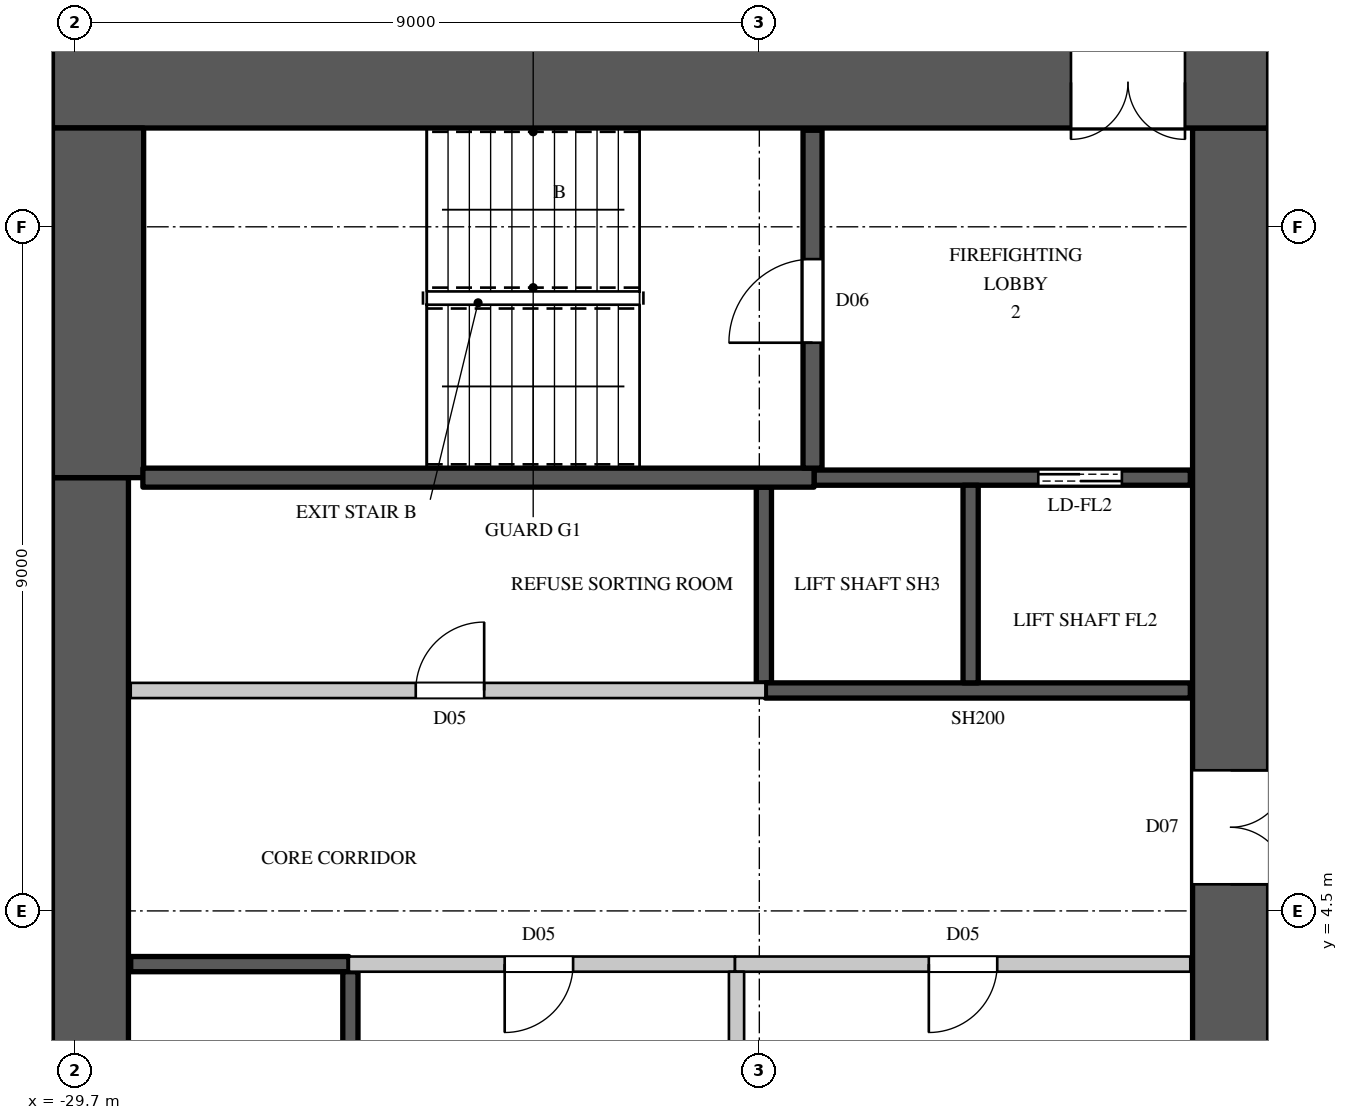
"""IFC4 building model, lengths in metres.
Left out: names, types, materials, properties, quantities, classifications, styles, units other than length and angle.
Written with IfcOpenShell. Run it as: python <this file> out.ifc"""

import sys

from ifc_helpers import new_model, si_unit, direction, frame, frame_2d, origin, place, context, subcontext, project, spatial, rectangle, extrude, element, fill, save


model = new_model("IFC4")
c1 = context("Model", 3, precision=1e-05, world=origin(), true_north=direction((0.0, 1.0)))
c2 = subcontext(c1, "Body", "Model", "MODEL_VIEW")
j1 = project(units=[si_unit("LENGTHUNIT", "METRE"), si_unit("PLANEANGLEUNIT", "RADIAN")], contexts=[c1])
p1 = place(None, origin())
s1 = spatial("IfcSite", under=j1, at=p1, CompositionType="ELEMENT")
p2 = place(p1, origin())
s2 = spatial("IfcBuilding", under=s1, at=p2, CompositionType="ELEMENT")
p3 = place(p2, frame((0.0, 0.0, 62.7)))
s3 = spatial("IfcBuildingStorey", under=s2, at=p3, CompositionType="ELEMENT", Elevation=62.7)
p4 = place(p3, frame((-30.0, 15.4, 0.0), z_axis=(0.0, 0.0, 1.0), x_axis=(1.0, 0.0, 0.0)))
e1 = element("IfcWall", 1, at=p4, inside=s3, PredefinedType="SHEAR", context=c2, shape_type="SweptSolid", body=[
    extrude(rectangle(XDim=16.0, YDim=1.2, at=frame_2d((8.0, 0.0))), origin(), (0.0, 0.0, 1.0), 3.6),
])
p5 = place(p4, frame((13.4, 0.0, 0.0)))
e2 = element("IfcOpeningElement", 2, at=p5, cuts=e1, PredefinedType="OPENING", context=c2, shape_type="SweptSolid", body=[
    extrude(rectangle(XDim=1.5, YDim=2.4, at=frame_2d((0.75, 1.2))), frame((0.0, 0.61, 0.0), z_axis=(0.0, -1.0, 0.0), x_axis=(1.0, 0.0, 0.0)), (0.0, 0.0, 1.0), 1.22),
])
p6 = place(p3, frame((-14.5, -14.8, 0.0), z_axis=(0.0, 0.0, 1.0), x_axis=(0.0, 1.0, 0.0)))
e3 = element("IfcWall", 3, at=p6, inside=s3, PredefinedType="SHEAR", context=c2, shape_type="SweptSolid", body=[
    extrude(rectangle(XDim=29.6, YDim=1.0, at=frame_2d((14.8, 0.0))), origin(), (0.0, 0.0, 1.0), 3.6),
])
p7 = place(p6, frame((8.45, 0.0, 0.0)))
e4 = element("IfcOpeningElement", 4, at=p7, cuts=e3, PredefinedType="OPENING", context=c2, shape_type="SweptSolid", body=[
    extrude(rectangle(XDim=1.5, YDim=2.4, at=frame_2d((0.75, 1.2))), frame((0.0, 0.51, 0.0), z_axis=(0.0, -1.0, 0.0), x_axis=(1.0, 0.0, 0.0)), (0.0, 0.0, 1.0), 1.02),
])
p8 = place(p6, frame((19.65, 0.0, 0.0)))
e5 = element("IfcOpeningElement", 5, at=p8, cuts=e3, PredefinedType="OPENING", context=c2, shape_type="SweptSolid", body=[
    extrude(rectangle(XDim=1.5, YDim=2.4, at=frame_2d((0.75, 1.2))), frame((0.0, 0.51, 0.0), z_axis=(0.0, -1.0, 0.0), x_axis=(1.0, 0.0, 0.0)), (0.0, 0.0, 1.0), 1.02),
])
p9 = place(p6, frame((14.5, 0.0, 0.0)))
e6 = element("IfcOpeningElement", 6, at=p9, cuts=e3, PredefinedType="OPENING", context=c2, shape_type="SweptSolid", body=[
    extrude(rectangle(XDim=0.6, YDim=2.0, at=frame_2d((0.3, 1.0))), frame((0.0, 0.51, 0.0), z_axis=(0.0, -1.0, 0.0), x_axis=(1.0, 0.0, 0.0)), (0.0, 0.0, 1.0), 1.02),
])
p10 = place(p3, frame((-29.5, -10.2, 0.0), z_axis=(0.0, 0.0, 1.0), x_axis=(0.0, 1.0, 0.0)))
e7 = element("IfcWall", 7, at=p10, inside=s3, PredefinedType="SHEAR", context=c2, shape_type="SweptSolid", body=[
    extrude(rectangle(XDim=20.4, YDim=1.0, at=frame_2d((10.2, 0.0))), origin(), (0.0, 0.0, 1.0), 3.6),
])
p11 = place(p3, frame((-29.4, 10.2, 0.0), z_axis=(0.0, 0.0, 1.0), x_axis=(0.0, 1.0, 0.0)))
e8 = element("IfcWall", 8, at=p11, inside=s3, PredefinedType="SHEAR", context=c2, shape_type="SweptSolid", body=[
    extrude(rectangle(XDim=4.6, YDim=1.2, at=frame_2d((2.3, 0.0))), origin(), (0.0, 0.0, 1.0), 3.6),
])
p12 = place(p3, frame((-28.97, 7.4, 0.0), z_axis=(0.0, 0.0, 1.0), x_axis=(1.0, 0.0, 0.0)))
e9 = element("IfcWall", 9, at=p12, inside=s3, PredefinedType="PARTITIONING", context=c2, shape_type="SweptSolid", body=[
    extrude(rectangle(XDim=8.35, YDim=0.2, at=frame_2d((4.175, 0.0))), origin(), (0.0, 0.0, 1.0), 3.3),
])
p13 = place(p12, frame((3.75, 0.0, 0.0)))
e10 = element("IfcOpeningElement", 10, at=p13, cuts=e9, PredefinedType="OPENING", context=c2, shape_type="SweptSolid", body=[
    extrude(rectangle(XDim=0.9, YDim=2.2, at=frame_2d((0.45, 1.1))), frame((0.0, 0.11, 0.0), z_axis=(0.0, -1.0, 0.0), x_axis=(1.0, 0.0, 0.0)), (0.0, 0.0, 1.0), 0.22),
])
p14 = place(p3, frame((-26.1, 3.8, 0.0), z_axis=(0.0, 0.0, 1.0), x_axis=(1.0, 0.0, 0.0)))
e11 = element("IfcWall", 11, at=p14, inside=s3, PredefinedType="PARTITIONING", context=c2, shape_type="SweptSolid", body=[
    extrude(rectangle(XDim=5.08, YDim=0.2, at=frame_2d((2.54, 0.0))), origin(), (0.0, 0.0, 1.0), 3.3),
])
p15 = place(p14, frame((2.05, 0.0, 0.0)))
e12 = element("IfcOpeningElement", 12, at=p15, cuts=e11, PredefinedType="OPENING", context=c2, shape_type="SweptSolid", body=[
    extrude(rectangle(XDim=0.9, YDim=2.2, at=frame_2d((0.45, 1.1))), frame((0.0, 0.11, 0.0), z_axis=(0.0, -1.0, 0.0), x_axis=(1.0, 0.0, 0.0)), (0.0, 0.0, 1.0), 0.22),
])
p16 = place(p3, frame((-21.02, 3.8, 0.0), z_axis=(0.0, 0.0, 1.0), x_axis=(1.0, 0.0, 0.0)))
e13 = element("IfcWall", 13, at=p16, inside=s3, PredefinedType="PARTITIONING", context=c2, shape_type="SweptSolid", body=[
    extrude(rectangle(XDim=5.99, YDim=0.2, at=frame_2d((2.995, 0.0))), origin(), (0.0, 0.0, 1.0), 3.3),
])
p17 = place(p16, frame((2.55, 0.0, 0.0)))
e14 = element("IfcOpeningElement", 14, at=p17, cuts=e13, PredefinedType="OPENING", context=c2, shape_type="SweptSolid", body=[
    extrude(rectangle(XDim=0.9, YDim=2.2, at=frame_2d((0.45, 1.1))), frame((0.0, 0.11, 0.0), z_axis=(0.0, -1.0, 0.0), x_axis=(1.0, 0.0, 0.0)), (0.0, 0.0, 1.0), 0.22),
])
p18 = place(p3, frame((-21.0, 1.1, 0.0), z_axis=(0.0, 0.0, 1.0), x_axis=(0.0, 1.0, 0.0)))
e15 = element("IfcWall", 15, at=p18, inside=s3, PredefinedType="PARTITIONING", context=c2, shape_type="SweptSolid", body=[
    extrude(rectangle(XDim=2.6, YDim=0.2, at=frame_2d((1.3, 0.0))), origin(), (0.0, 0.0, 1.0), 3.3),
])
p19 = place(p3, frame((-28.97, 3.8, 0.0), z_axis=(0.0, 0.0, 1.0), x_axis=(1.0, 0.0, 0.0)))
e16 = element("IfcWall", 16, at=p19, inside=s3, PredefinedType="SHEAR", context=c2, shape_type="SweptSolid", body=[
    extrude(rectangle(XDim=2.87, YDim=0.2, at=frame_2d((1.435, 0.0))), origin(), (0.0, 0.0, 1.0), 3.3),
])
p20 = place(p3, frame((-26.08, 1.1, 0.0), z_axis=(0.0, 0.0, 1.0), x_axis=(0.0, 1.0, 0.0)))
e17 = element("IfcWall", 17, at=p20, inside=s3, PredefinedType="SHEAR", context=c2, shape_type="SweptSolid", body=[
    extrude(rectangle(XDim=2.6, YDim=0.2, at=frame_2d((1.3, 0.0))), origin(), (0.0, 0.0, 1.0), 3.3),
])
p21 = place(p3, frame((-20.64, 7.5, 0.0), z_axis=(0.0, 0.0, 1.0), x_axis=(0.0, 1.0, 0.0)))
e18 = element("IfcWall", 18, at=p21, inside=s3, PredefinedType="SHEAR", context=c2, shape_type="SweptSolid", body=[
    extrude(rectangle(XDim=2.575, YDim=0.2, at=frame_2d((1.288, 0.0))), origin(), (0.0, 0.0, 1.0), 3.3),
])
p22 = place(p3, frame((-20.62, 7.4, 0.0), z_axis=(0.0, 0.0, 1.0), x_axis=(1.0, 0.0, 0.0)))
e19 = element("IfcWall", 19, at=p22, inside=s3, PredefinedType="SHEAR", context=c2, shape_type="SweptSolid", body=[
    extrude(rectangle(XDim=5.59, YDim=0.2, at=frame_2d((2.795, 0.0))), origin(), (0.0, 0.0, 1.0), 3.3),
])
p23 = place(p3, frame((-19.98, 10.2, 0.0), z_axis=(0.0, 0.0, 1.0), x_axis=(1.0, 0.0, 0.0)))
e20 = element("IfcWall", 20, at=p23, inside=s3, PredefinedType="SHEAR", context=c2, shape_type="SweptSolid", body=[
    extrude(rectangle(XDim=4.95, YDim=0.2, at=frame_2d((2.475, 0.0))), origin(), (0.0, 0.0, 1.0), 3.3),
])
p24 = place(p23, frame((2.95, 0.0, 0.0)))
e21 = element("IfcOpeningElement", 21, at=p24, cuts=e20, PredefinedType="OPENING", context=c2, shape_type="SweptSolid", body=[
    extrude(rectangle(XDim=1.1, YDim=2.2, at=frame_2d((0.55, 1.1))), frame((0.0, 0.11, 0.0), z_axis=(0.0, -1.0, 0.0), x_axis=(1.0, 0.0, 0.0)), (0.0, 0.0, 1.0), 0.22),
])
p25 = place(p3, frame((-17.92, 7.5, 0.0), z_axis=(0.0, 0.0, 1.0), x_axis=(0.0, 1.0, 0.0)))
e22 = element("IfcWall", 22, at=p25, inside=s3, PredefinedType="SHEAR", context=c2, shape_type="SweptSolid", body=[
    extrude(rectangle(XDim=2.6, YDim=0.2, at=frame_2d((1.3, 0.0))), origin(), (0.0, 0.0, 1.0), 3.6),
])
p26 = place(p3, frame((-28.81, 10.2, 0.0), z_axis=(0.0, 0.0, 1.0), x_axis=(1.0, 0.0, 0.0)))
e23 = element("IfcWall", 23, at=p26, inside=s3, PredefinedType="SHEAR", context=c2, shape_type="SweptSolid", body=[
    extrude(rectangle(XDim=8.83, YDim=0.25, at=frame_2d((4.415, 0.0))), origin(), (0.0, 0.0, 1.0), 3.3),
])
p27 = place(p3, frame((-20.0, 10.325, 0.0), z_axis=(0.0, 0.0, 1.0), x_axis=(0.0, 1.0, 0.0)))
e24 = element("IfcWall", 24, at=p27, inside=s3, PredefinedType="SHEAR", context=c2, shape_type="SweptSolid", body=[
    extrude(rectangle(XDim=4.445, YDim=0.25, at=frame_2d((2.223, 0.0))), origin(), (0.0, 0.0, 1.0), 3.3),
])
p28 = place(p27, frame((1.65, 0.0, 0.0)))
e25 = element("IfcOpeningElement", 25, at=p28, cuts=e24, PredefinedType="OPENING", context=c2, shape_type="SweptSolid", body=[
    extrude(rectangle(XDim=1.1, YDim=2.2, at=frame_2d((0.55, 1.1))), frame((0.0, 0.135, 0.0), z_axis=(0.0, -1.0, 0.0), x_axis=(1.0, 0.0, 0.0)), (0.0, 0.0, 1.0), 0.27),
])
p29 = place(p28, origin())
e26 = element("IfcDoor", 26, at=p29, inside=s3, OperationType="SINGLE_SWING_LEFT", PredefinedType="DOOR", context=c2, shape_type="SweptSolid", body=[
    extrude(rectangle(XDim=1.1, YDim=2.2, at=frame_2d((0.55, 1.1))), frame((0.0, 0.025, 0.0), z_axis=(0.0, -1.0, 0.0), x_axis=(1.0, 0.0, 0.0)), (0.0, 0.0, 1.0), 0.05),
])
fill(e25, e26)
p30 = place(p15, origin())
e27 = element("IfcDoor", 27, at=p30, inside=s3, OperationType="SINGLE_SWING_RIGHT", PredefinedType="DOOR", context=c2, shape_type="SweptSolid", body=[
    extrude(rectangle(XDim=0.9, YDim=2.2, at=frame_2d((0.45, 1.1))), frame((0.0, 0.025, 0.0), z_axis=(0.0, -1.0, 0.0), x_axis=(1.0, 0.0, 0.0)), (0.0, 0.0, 1.0), 0.05),
])
fill(e12, e27)
p31 = place(p17, origin())
e28 = element("IfcDoor", 28, at=p31, inside=s3, OperationType="SINGLE_SWING_RIGHT", PredefinedType="DOOR", context=c2, shape_type="SweptSolid", body=[
    extrude(rectangle(XDim=0.9, YDim=2.2, at=frame_2d((0.45, 1.1))), frame((0.0, 0.025, 0.0), z_axis=(0.0, -1.0, 0.0), x_axis=(1.0, 0.0, 0.0)), (0.0, 0.0, 1.0), 0.05),
])
fill(e14, e28)
p32 = place(p13, origin())
e29 = element("IfcDoor", 29, at=p32, inside=s3, OperationType="SINGLE_SWING_RIGHT", PredefinedType="DOOR", context=c2, shape_type="SweptSolid", body=[
    extrude(rectangle(XDim=0.9, YDim=2.2, at=frame_2d((0.45, 1.1))), frame((0.0, 0.025, 0.0), z_axis=(0.0, -1.0, 0.0), x_axis=(1.0, 0.0, 0.0)), (0.0, 0.0, 1.0), 0.05),
])
fill(e10, e29)
p33 = place(p24, origin())
e30 = element("IfcDoor", 30, at=p33, inside=s3, OperationType="DOUBLE_DOOR_SLIDING", PredefinedType="DOOR", context=c2, shape_type="SweptSolid", body=[
    extrude(rectangle(XDim=1.1, YDim=2.2, at=frame_2d((0.55, 1.1))), frame((0.0, 0.025, 0.0), z_axis=(0.0, -1.0, 0.0), x_axis=(1.0, 0.0, 0.0)), (0.0, 0.0, 1.0), 0.05),
])
fill(e21, e30)
p34 = place(p5, origin())
e31 = element("IfcDoor", 31, at=p34, inside=s3, OperationType="DOUBLE_DOOR_SINGLE_SWING", PredefinedType="DOOR", context=c2, shape_type="SweptSolid", body=[
    extrude(rectangle(XDim=1.5, YDim=2.4, at=frame_2d((0.75, 1.2))), frame((0.0, 0.025, 0.0), z_axis=(0.0, -1.0, 0.0), x_axis=(1.0, 0.0, 0.0)), (0.0, 0.0, 1.0), 0.05),
])
fill(e2, e31)
p35 = place(p8, origin())
e32 = element("IfcDoor", 32, at=p35, inside=s3, OperationType="DOUBLE_DOOR_SINGLE_SWING", PredefinedType="DOOR", context=c2, shape_type="SweptSolid", body=[
    extrude(rectangle(XDim=1.5, YDim=2.4, at=frame_2d((0.75, 1.2))), frame((0.0, -0.445, 0.0), z_axis=(0.0, -1.0, 0.0), x_axis=(1.0, 0.0, 0.0)), (0.0, 0.0, 1.0), 0.05),
])
fill(e5, e32)
save(model, sys.argv[1])
